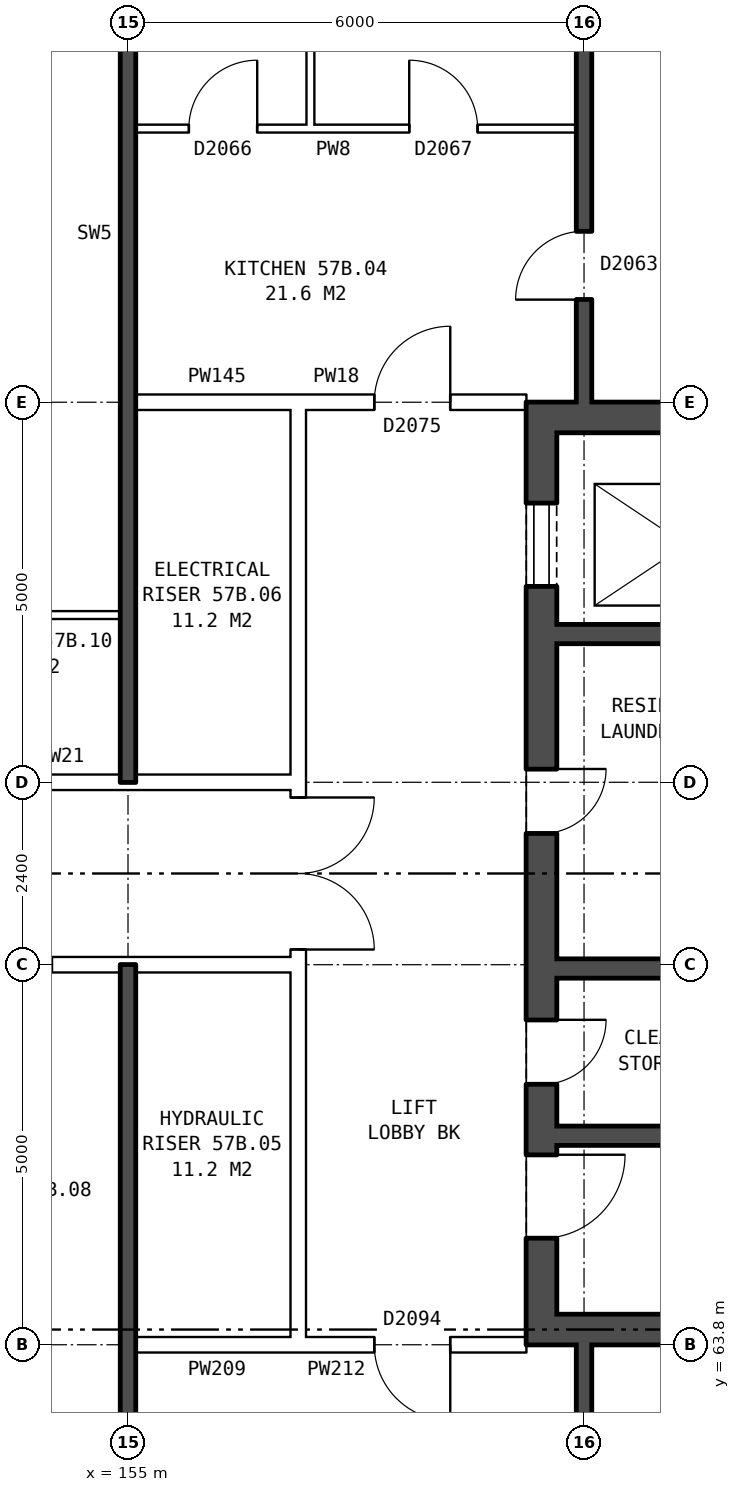
"""IFC4 building model, lengths in metres.
Left out: names, types, materials, properties, quantities, classifications, styles, units other than length and angle.
Written with IfcOpenShell. Run it as: python <this file> out.ifc"""

import sys

from ifc_helpers import new_model, si_unit, direction, frame, frame_2d, origin, place, context, subcontext, project, spatial, rectangle, extrude, element, fill, save


model = new_model("IFC4")
c1 = context("Model", 3, precision=1e-05, world=origin(), true_north=direction((0.0, 1.0)))
c2 = subcontext(c1, "Body", "Model", "MODEL_VIEW")
j1 = project(units=[si_unit("LENGTHUNIT", "METRE"), si_unit("PLANEANGLEUNIT", "RADIAN")], contexts=[c1])
p1 = place(None, origin())
s1 = spatial("IfcSite", under=j1, at=p1, CompositionType="ELEMENT")
p2 = place(p1, origin())
s2 = spatial("IfcBuilding", under=s1, at=p2, CompositionType="ELEMENT")
p3 = place(p2, frame((0.0, 0.0, 202.8)))
s3 = spatial("IfcBuildingStorey", under=s2, at=p3, CompositionType="ELEMENT", Elevation=202.8)
p4 = place(p3, frame((160.44, 76.2, 0.0), z_axis=(0.0, 0.0, 1.0), x_axis=(0.0, -1.0, 0.0)))
e1 = element("IfcWall", 1, at=p4, inside=s3, PredefinedType="SHEAR", context=c2, shape_type="SweptSolid", body=[
    extrude(rectangle(XDim=12.4, YDim=0.4, at=frame_2d((6.2, 0.0))), origin(), (0.0, 0.0, 1.0), 2.85),
])
p5 = place(p4, frame((1.325, 0.0, 0.0)))
e2 = element("IfcOpeningElement", 2, at=p5, cuts=e1, PredefinedType="OPENING", context=c2, shape_type="SweptSolid", body=[
    extrude(rectangle(XDim=1.1, YDim=2.1, at=frame_2d((0.55, 1.05))), frame((0.0, 0.21, 0.0), z_axis=(0.0, -1.0, 0.0), x_axis=(1.0, 0.0, 0.0)), (0.0, 0.0, 1.0), 0.42),
])
p6 = place(p4, frame((4.825, 0.0, 0.0)))
e3 = element("IfcOpeningElement", 3, at=p6, cuts=e1, PredefinedType="OPENING", context=c2, shape_type="SweptSolid", body=[
    extrude(rectangle(XDim=0.85, YDim=2.1, at=frame_2d((0.425, 1.05))), frame((0.0, 0.21, 0.0), z_axis=(0.0, -1.0, 0.0), x_axis=(1.0, 0.0, 0.0)), (0.0, 0.0, 1.0), 0.42),
])
p7 = place(p4, frame((9.9, 0.0, 0.0)))
e4 = element("IfcOpeningElement", 4, at=p7, cuts=e1, PredefinedType="OPENING", context=c2, shape_type="SweptSolid", body=[
    extrude(rectangle(XDim=1.1, YDim=2.1, at=frame_2d((0.55, 1.05))), frame((0.0, 0.21, 0.0), z_axis=(0.0, -1.0, 0.0), x_axis=(1.0, 0.0, 0.0)), (0.0, 0.0, 1.0), 0.42),
])
p8 = place(p4, frame((8.125, 0.0, 0.0)))
e5 = element("IfcOpeningElement", 5, at=p8, cuts=e1, PredefinedType="OPENING", context=c2, shape_type="SweptSolid", body=[
    extrude(rectangle(XDim=0.85, YDim=2.1, at=frame_2d((0.425, 1.05))), frame((0.0, 0.21, 0.0), z_axis=(0.0, -1.0, 0.0), x_axis=(1.0, 0.0, 0.0)), (0.0, 0.0, 1.0), 0.42),
])
for number, where, z_axis, x_axis in (
    (6, (160.64, 76.0, 0.0), (0.0, 0.0, 1.0), (1.0, 0.0, 0.0)),
    (7, (160.64, 64.0, 0.0), (0.0, 0.0, 1.0), (1.0, 0.0, 0.0)),
):
    element("IfcWall", number, at=place(p3, frame(where, z_axis=z_axis, x_axis=x_axis)), inside=s3, PredefinedType="SHEAR", context=c2, shape_type="SweptSolid", body=[
        extrude(rectangle(XDim=7.6, YDim=0.4, at=frame_2d((3.8, 0.0))), origin(), (0.0, 0.0, 1.0), 2.85),
    ])
p9 = place(p3, frame((160.64, 73.15, 0.0), z_axis=(0.0, 0.0, 1.0), x_axis=(1.0, 0.0, 0.0)))
e8 = element("IfcWall", 8, at=p9, inside=s3, PredefinedType="SHEAR", context=c2, shape_type="SweptSolid", body=[
    extrude(rectangle(XDim=4.775, YDim=0.25, at=frame_2d((2.388, 0.0))), origin(), (0.0, 0.0, 1.0), 2.85),
])
p10 = place(p3, frame((160.64, 68.75, 0.0), z_axis=(0.0, 0.0, 1.0), x_axis=(1.0, 0.0, 0.0)))
e9 = element("IfcWall", 9, at=p10, inside=s3, PredefinedType="SHEAR", context=c2, shape_type="SweptSolid", body=[
    extrude(rectangle(XDim=7.6, YDim=0.25, at=frame_2d((3.8, 0.0))), origin(), (0.0, 0.0, 1.0), 2.85),
])
p11 = place(p10, frame((5.175, 0.0, 0.0)))
e10 = element("IfcOpeningElement", 10, at=p11, cuts=e9, PredefinedType="OPENING", context=c2, shape_type="SweptSolid", body=[
    extrude(rectangle(XDim=1.1, YDim=2.1, at=frame_2d((0.55, 1.05))), frame((0.0, 0.135, 0.0), z_axis=(0.0, -1.0, 0.0), x_axis=(1.0, 0.0, 0.0)), (0.0, 0.0, 1.0), 0.27),
])
p12 = place(p10, frame((3.35, 0.0, 0.0)))
e11 = element("IfcOpeningElement", 11, at=p12, cuts=e9, PredefinedType="OPENING", context=c2, shape_type="SweptSolid", body=[
    extrude(rectangle(XDim=0.85, YDim=2.1, at=frame_2d((0.425, 1.05))), frame((0.0, 0.135, 0.0), z_axis=(0.0, -1.0, 0.0), x_axis=(1.0, 0.0, 0.0)), (0.0, 0.0, 1.0), 0.27),
])
p13 = place(p3, frame((160.64, 66.55, 0.0), z_axis=(0.0, 0.0, 1.0), x_axis=(1.0, 0.0, 0.0)))
e12 = element("IfcWall", 12, at=p13, inside=s3, PredefinedType="SHEAR", context=c2, shape_type="SweptSolid", body=[
    extrude(rectangle(XDim=2.525, YDim=0.25, at=frame_2d((1.263, 0.0))), origin(), (0.0, 0.0, 1.0), 2.85),
])
p14 = place(p3, frame((157.24, 63.9, 0.0), z_axis=(0.0, 0.0, 1.0), x_axis=(0.0, 1.0, 0.0)))
e13 = element("IfcWall", 13, at=p14, inside=s3, PredefinedType="PARTITIONING", context=c2, shape_type="SweptSolid", body=[
    extrude(rectangle(XDim=12.2, YDim=0.2, at=frame_2d((6.1, 0.0))), origin(), (0.0, 0.0, 1.0), 2.85),
])
p15 = place(p14, frame((5.1, 0.0, 0.0)))
e14 = element("IfcOpeningElement", 14, at=p15, cuts=e13, PredefinedType="OPENING", context=c2, shape_type="SweptSolid", body=[
    extrude(rectangle(XDim=2.0, YDim=2.1, at=frame_2d((1.0, 1.05))), frame((0.0, 0.11, 0.0), z_axis=(0.0, -1.0, 0.0), x_axis=(1.0, 0.0, 0.0)), (0.0, 0.0, 1.0), 0.22),
])
p16 = place(p3, frame((155.1, 63.8, 0.0), z_axis=(0.0, 0.0, 1.0), x_axis=(1.0, 0.0, 0.0)))
e15 = element("IfcWall", 15, at=p16, inside=s3, PredefinedType="PARTITIONING", context=c2, shape_type="SweptSolid", body=[
    extrude(rectangle(XDim=2.14, YDim=0.2, at=frame_2d((1.07, 0.0))), origin(), (0.0, 0.0, 1.0), 2.85),
])
p17 = place(p3, frame((157.24, 63.8, 0.0), z_axis=(0.0, 0.0, 1.0), x_axis=(1.0, 0.0, 0.0)))
e16 = element("IfcWall", 16, at=p17, inside=s3, PredefinedType="PARTITIONING", context=c2, shape_type="SweptSolid", body=[
    extrude(rectangle(XDim=3.0, YDim=0.2, at=frame_2d((1.5, 0.0))), origin(), (0.0, 0.0, 1.0), 2.85),
])
p18 = place(p17, frame((1.0, 0.0, 0.0)))
e17 = element("IfcOpeningElement", 17, at=p18, cuts=e16, PredefinedType="OPENING", context=c2, shape_type="SweptSolid", body=[
    extrude(rectangle(XDim=1.0, YDim=2.1, at=frame_2d((0.5, 1.05))), frame((0.0, 0.11, 0.0), z_axis=(0.0, -1.0, 0.0), x_axis=(1.0, 0.0, 0.0)), (0.0, 0.0, 1.0), 0.22),
])
p19 = place(p3, frame((142.76, 68.8, 0.0), z_axis=(0.0, 0.0, 1.0), x_axis=(1.0, 0.0, 0.0)))
e18 = element("IfcWall", 18, at=p19, inside=s3, PredefinedType="PARTITIONING", context=c2, shape_type="SweptSolid", body=[
    extrude(rectangle(XDim=14.48, YDim=0.2, at=frame_2d((7.24, 0.0))), origin(), (0.0, 0.0, 1.0), 2.85),
])
p20 = place(p19, frame((1.12, 0.0, 0.0)))
e19 = element("IfcOpeningElement", 19, at=p20, cuts=e18, PredefinedType="OPENING", context=c2, shape_type="SweptSolid", body=[
    extrude(rectangle(XDim=1.0, YDim=2.1, at=frame_2d((0.5, 1.05))), frame((0.0, 0.11, 0.0), z_axis=(0.0, -1.0, 0.0), x_axis=(1.0, 0.0, 0.0)), (0.0, 0.0, 1.0), 0.22),
])
p21 = place(p19, frame((10.24, 0.0, 0.0)))
e20 = element("IfcOpeningElement", 20, at=p21, cuts=e18, PredefinedType="OPENING", context=c2, shape_type="SweptSolid", body=[
    extrude(rectangle(XDim=1.0, YDim=2.1, at=frame_2d((0.5, 1.05))), frame((0.0, 0.11, 0.0), z_axis=(0.0, -1.0, 0.0), x_axis=(1.0, 0.0, 0.0)), (0.0, 0.0, 1.0), 0.22),
])
p22 = place(p3, frame((142.76, 71.2, 0.0), z_axis=(0.0, 0.0, 1.0), x_axis=(1.0, 0.0, 0.0)))
e21 = element("IfcWall", 21, at=p22, inside=s3, PredefinedType="PARTITIONING", context=c2, shape_type="SweptSolid", body=[
    extrude(rectangle(XDim=14.48, YDim=0.2, at=frame_2d((7.24, 0.0))), origin(), (0.0, 0.0, 1.0), 2.85),
])
p23 = place(p22, frame((1.12, 0.0, 0.0)))
e22 = element("IfcOpeningElement", 22, at=p23, cuts=e21, PredefinedType="OPENING", context=c2, shape_type="SweptSolid", body=[
    extrude(rectangle(XDim=1.0, YDim=2.1, at=frame_2d((0.5, 1.05))), frame((0.0, 0.11, 0.0), z_axis=(0.0, -1.0, 0.0), x_axis=(1.0, 0.0, 0.0)), (0.0, 0.0, 1.0), 0.22),
])
p24 = place(p22, frame((7.24, 0.0, 0.0)))
e23 = element("IfcOpeningElement", 23, at=p24, cuts=e21, PredefinedType="OPENING", context=c2, shape_type="SweptSolid", body=[
    extrude(rectangle(XDim=1.0, YDim=2.1, at=frame_2d((0.5, 1.05))), frame((0.0, 0.11, 0.0), z_axis=(0.0, -1.0, 0.0), x_axis=(1.0, 0.0, 0.0)), (0.0, 0.0, 1.0), 0.22),
])
p25 = place(p3, frame((152.0, 73.4, 0.0), z_axis=(0.0, 0.0, 1.0), x_axis=(1.0, 0.0, 0.0)))
e24 = element("IfcWall", 24, at=p25, inside=s3, PredefinedType="PARTITIONING", context=c2, shape_type="SweptSolid", body=[
    extrude(rectangle(XDim=2.9, YDim=0.1, at=frame_2d((1.45, 0.0))), origin(), (0.0, 0.0, 1.0), 2.85),
])
p26 = place(p3, frame((155.1, 76.2, 0.0), z_axis=(0.0, 0.0, 1.0), x_axis=(1.0, 0.0, 0.0)))
e25 = element("IfcWall", 25, at=p26, inside=s3, PredefinedType="PARTITIONING", context=c2, shape_type="SweptSolid", body=[
    extrude(rectangle(XDim=2.14, YDim=0.2, at=frame_2d((1.07, 0.0))), origin(), (0.0, 0.0, 1.0), 2.85),
])
p27 = place(p3, frame((157.24, 76.2, 0.0), z_axis=(0.0, 0.0, 1.0), x_axis=(1.0, 0.0, 0.0)))
e26 = element("IfcWall", 26, at=p27, inside=s3, PredefinedType="PARTITIONING", context=c2, shape_type="SweptSolid", body=[
    extrude(rectangle(XDim=3.0, YDim=0.2, at=frame_2d((1.5, 0.0))), origin(), (0.0, 0.0, 1.0), 2.85),
])
p28 = place(p27, frame((1.0, 0.0, 0.0)))
e27 = element("IfcOpeningElement", 27, at=p28, cuts=e26, PredefinedType="OPENING", context=c2, shape_type="SweptSolid", body=[
    extrude(rectangle(XDim=1.0, YDim=2.1, at=frame_2d((0.5, 1.05))), frame((0.0, 0.11, 0.0), z_axis=(0.0, -1.0, 0.0), x_axis=(1.0, 0.0, 0.0)), (0.0, 0.0, 1.0), 0.22),
])
p29 = place(p3, frame((155.1, 79.8, 0.0), z_axis=(0.0, 0.0, 1.0), x_axis=(1.0, 0.0, 0.0)))
e28 = element("IfcWall", 28, at=p29, inside=s3, PredefinedType="PARTITIONING", context=c2, shape_type="SweptSolid", body=[
    extrude(rectangle(XDim=5.8, YDim=0.1, at=frame_2d((2.9, 0.0))), origin(), (0.0, 0.0, 1.0), 2.85),
])
p30 = place(p29, frame((3.6, 0.0, 0.0)))
e29 = element("IfcOpeningElement", 29, at=p30, cuts=e28, PredefinedType="OPENING", context=c2, shape_type="SweptSolid", body=[
    extrude(rectangle(XDim=0.9, YDim=2.1, at=frame_2d((0.45, 1.05))), frame((0.0, 0.06, 0.0), z_axis=(0.0, -1.0, 0.0), x_axis=(1.0, 0.0, 0.0)), (0.0, 0.0, 1.0), 0.12),
])
p31 = place(p29, frame((0.7, 0.0, 0.0)))
e30 = element("IfcOpeningElement", 30, at=p31, cuts=e28, PredefinedType="OPENING", context=c2, shape_type="SweptSolid", body=[
    extrude(rectangle(XDim=0.9, YDim=2.1, at=frame_2d((0.45, 1.05))), frame((0.0, 0.06, 0.0), z_axis=(0.0, -1.0, 0.0), x_axis=(1.0, 0.0, 0.0)), (0.0, 0.0, 1.0), 0.12),
])
for number, where, z_axis, x_axis in (
    (31, (155.0, 54.36, 0.0), (0.0, 0.0, 1.0), (0.0, 1.0, 0.0)),
    (32, (155.0, 71.2, 0.0), (0.0, 0.0, 1.0), (0.0, 1.0, 0.0)),
):
    element("IfcWall", number, at=place(p3, frame(where, z_axis=z_axis, x_axis=x_axis)), inside=s3, PredefinedType="SOLIDWALL", context=c2, shape_type="SweptSolid", body=[
        extrude(rectangle(XDim=14.44, YDim=0.2, at=frame_2d((7.22, 0.0))), origin(), (0.0, 0.0, 1.0), 2.85),
    ])
p32 = place(p3, frame((157.4, 79.85, 0.0), z_axis=(0.0, 0.0, 1.0), x_axis=(0.0, 1.0, 0.0)))
e33 = element("IfcWall", 33, at=p32, inside=s3, PredefinedType="PARTITIONING", context=c2, shape_type="SweptSolid", body=[
    extrude(rectangle(XDim=2.3, YDim=0.1, at=frame_2d((1.15, 0.0))), origin(), (0.0, 0.0, 1.0), 2.85),
])
p33 = place(p3, frame((161.0, 54.36, 0.0), z_axis=(0.0, 0.0, 1.0), x_axis=(0.0, 1.0, 0.0)))
e34 = element("IfcWall", 34, at=p33, inside=s3, PredefinedType="SOLIDWALL", context=c2, shape_type="SweptSolid", body=[
    extrude(rectangle(XDim=9.44, YDim=0.2, at=frame_2d((4.72, 0.0))), origin(), (0.0, 0.0, 1.0), 2.85),
])
p34 = place(p33, frame((7.19, 0.0, 0.0)))
e35 = element("IfcOpeningElement", 35, at=p34, cuts=e34, PredefinedType="OPENING", context=c2, shape_type="SweptSolid", body=[
    extrude(rectangle(XDim=0.9, YDim=2.1, at=frame_2d((0.45, 1.05))), frame((0.0, 0.11, 0.0), z_axis=(0.0, -1.0, 0.0), x_axis=(1.0, 0.0, 0.0)), (0.0, 0.0, 1.0), 0.22),
])
p35 = place(p3, frame((161.0, 76.2, 0.0), z_axis=(0.0, 0.0, 1.0), x_axis=(0.0, 1.0, 0.0)))
e36 = element("IfcWall", 36, at=p35, inside=s3, PredefinedType="SOLIDWALL", context=c2, shape_type="SweptSolid", body=[
    extrude(rectangle(XDim=9.44, YDim=0.2, at=frame_2d((4.72, 0.0))), origin(), (0.0, 0.0, 1.0), 2.85),
])
p36 = place(p35, frame((1.35, 0.0, 0.0)))
e37 = element("IfcOpeningElement", 37, at=p36, cuts=e36, PredefinedType="OPENING", context=c2, shape_type="SweptSolid", body=[
    extrude(rectangle(XDim=0.9, YDim=2.1, at=frame_2d((0.45, 1.05))), frame((0.0, 0.11, 0.0), z_axis=(0.0, -1.0, 0.0), x_axis=(1.0, 0.0, 0.0)), (0.0, 0.0, 1.0), 0.22),
])
p37 = place(p5, origin())
e38 = element("IfcDoor", 38, at=p37, inside=s3, OperationType="DOUBLE_DOOR_SLIDING", PredefinedType="DOOR", context=c2, shape_type="SweptSolid", body=[
    extrude(rectangle(XDim=1.1, YDim=2.1, at=frame_2d((0.55, 1.05))), frame((0.0, 0.185, 0.0), z_axis=(0.0, -1.0, 0.0), x_axis=(1.0, 0.0, 0.0)), (0.0, 0.0, 1.0), 0.05),
])
fill(e2, e38)
p38 = place(p6, origin())
e39 = element("IfcDoor", 39, at=p38, inside=s3, OperationType="SINGLE_SWING_LEFT", PredefinedType="DOOR", context=c2, shape_type="SweptSolid", body=[
    extrude(rectangle(XDim=0.85, YDim=2.1, at=frame_2d((0.425, 1.05))), frame((0.0, 0.185, 0.0), z_axis=(0.0, -1.0, 0.0), x_axis=(1.0, 0.0, 0.0)), (0.0, 0.0, 1.0), 0.05),
])
fill(e3, e39)
p39 = place(p7, origin())
e40 = element("IfcDoor", 40, at=p39, inside=s3, OperationType="SINGLE_SWING_LEFT", PredefinedType="DOOR", context=c2, shape_type="SweptSolid", body=[
    extrude(rectangle(XDim=1.1, YDim=2.1, at=frame_2d((0.55, 1.05))), frame((0.0, 0.185, 0.0), z_axis=(0.0, -1.0, 0.0), x_axis=(1.0, 0.0, 0.0)), (0.0, 0.0, 1.0), 0.05),
])
fill(e4, e40)
p40 = place(p8, origin())
e41 = element("IfcDoor", 41, at=p40, inside=s3, OperationType="SINGLE_SWING_LEFT", PredefinedType="DOOR", context=c2, shape_type="SweptSolid", body=[
    extrude(rectangle(XDim=0.85, YDim=2.1, at=frame_2d((0.425, 1.05))), frame((0.0, 0.185, 0.0), z_axis=(0.0, -1.0, 0.0), x_axis=(1.0, 0.0, 0.0)), (0.0, 0.0, 1.0), 0.05),
])
fill(e5, e41)
p41 = place(p15, frame((2.0, 0.0, 0.0), z_axis=(0.0, 0.0, 1.0), x_axis=(-1.0, 0.0, 0.0)))
e42 = element("IfcDoor", 42, at=p41, inside=s3, OperationType="DOUBLE_DOOR_SINGLE_SWING", PredefinedType="DOOR", context=c2, shape_type="SweptSolid", body=[
    extrude(rectangle(XDim=2.0, YDim=2.1, at=frame_2d((1.0, 1.05))), frame((0.0, 0.025, 0.0), z_axis=(0.0, -1.0, 0.0), x_axis=(1.0, 0.0, 0.0)), (0.0, 0.0, 1.0), 0.05),
])
fill(e14, e42)
p42 = place(p18, frame((1.0, 0.0, 0.0), z_axis=(0.0, 0.0, 1.0), x_axis=(-1.0, 0.0, 0.0)))
e43 = element("IfcDoor", 43, at=p42, inside=s3, OperationType="SINGLE_SWING_LEFT", PredefinedType="DOOR", context=c2, shape_type="SweptSolid", body=[
    extrude(rectangle(XDim=1.0, YDim=2.1, at=frame_2d((0.5, 1.05))), frame((0.0, 0.025, 0.0), z_axis=(0.0, -1.0, 0.0), x_axis=(1.0, 0.0, 0.0)), (0.0, 0.0, 1.0), 0.05),
])
fill(e17, e43)
p43 = place(p30, origin())
e44 = element("IfcDoor", 44, at=p43, inside=s3, OperationType="SINGLE_SWING_LEFT", PredefinedType="DOOR", context=c2, shape_type="SweptSolid", body=[
    extrude(rectangle(XDim=0.9, YDim=2.1, at=frame_2d((0.45, 1.05))), frame((0.0, 0.025, 0.0), z_axis=(0.0, -1.0, 0.0), x_axis=(1.0, 0.0, 0.0)), (0.0, 0.0, 1.0), 0.05),
])
fill(e29, e44)
p44 = place(p28, origin())
e45 = element("IfcDoor", 45, at=p44, inside=s3, OperationType="SINGLE_SWING_RIGHT", PredefinedType="DOOR", context=c2, shape_type="SweptSolid", body=[
    extrude(rectangle(XDim=1.0, YDim=2.1, at=frame_2d((0.5, 1.05))), frame((0.0, 0.025, 0.0), z_axis=(0.0, -1.0, 0.0), x_axis=(1.0, 0.0, 0.0)), (0.0, 0.0, 1.0), 0.05),
])
fill(e27, e45)
p45 = place(p36, origin())
e46 = element("IfcDoor", 46, at=p45, inside=s3, OperationType="SINGLE_SWING_LEFT", PredefinedType="DOOR", context=c2, shape_type="SweptSolid", body=[
    extrude(rectangle(XDim=0.9, YDim=2.1, at=frame_2d((0.45, 1.05))), frame((0.0, 0.025, 0.0), z_axis=(0.0, -1.0, 0.0), x_axis=(1.0, 0.0, 0.0)), (0.0, 0.0, 1.0), 0.05),
])
fill(e37, e46)
p46 = place(p31, origin())
e47 = element("IfcDoor", 47, at=p46, inside=s3, OperationType="SINGLE_SWING_RIGHT", PredefinedType="DOOR", context=c2, shape_type="SweptSolid", body=[
    extrude(rectangle(XDim=0.9, YDim=2.1, at=frame_2d((0.45, 1.05))), frame((0.0, 0.025, 0.0), z_axis=(0.0, -1.0, 0.0), x_axis=(1.0, 0.0, 0.0)), (0.0, 0.0, 1.0), 0.05),
])
fill(e30, e47)
save(model, sys.argv[1])
